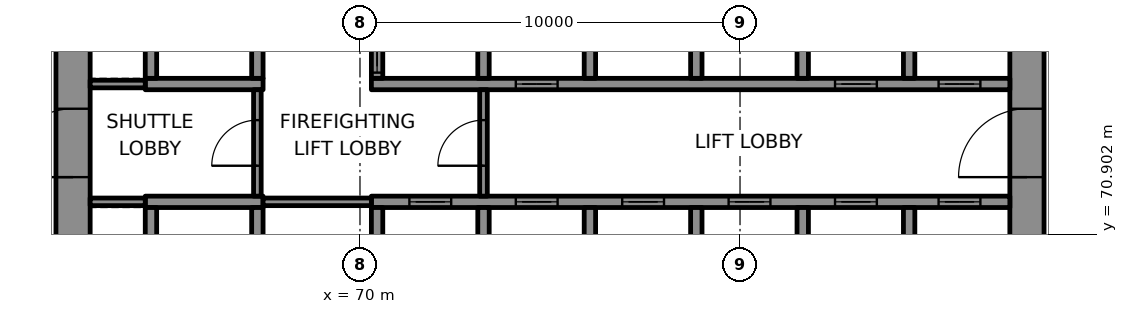
"""IFC4 building model, lengths in metres.
Left out: names, types, materials, properties, quantities, classifications, styles, units other than length and angle.
Written with IfcOpenShell. Run it as: python <this file> out.ifc"""

import sys

from ifc_helpers import new_model, si_unit, direction, frame, frame_2d, origin, place, context, subcontext, project, spatial, rectangle, extrude, element, fill, save


model = new_model("IFC4")
c1 = context("Model", 3, precision=1e-05, world=origin(), true_north=direction((0.0, 1.0)))
c2 = subcontext(c1, "Body", "Model", "MODEL_VIEW")
j1 = project(units=[si_unit("LENGTHUNIT", "METRE"), si_unit("PLANEANGLEUNIT", "RADIAN")], contexts=[c1])
p1 = place(None, origin())
s1 = spatial("IfcSite", under=j1, at=p1, CompositionType="ELEMENT")
p2 = place(p1, origin())
s2 = spatial("IfcBuilding", under=s1, at=p2, CompositionType="ELEMENT")
p3 = place(p2, frame((0.0, 0.0, 17.2)))
s3 = spatial("IfcBuildingStorey", under=s2, at=p3, CompositionType="ELEMENT", Elevation=17.2)
p4 = place(p3, frame((62.45, 66.9, 0.0), z_axis=(0.0, 0.0, 1.0), x_axis=(0.0, 1.0, 0.0)))
e1 = element("IfcWall", 1, at=p4, inside=s3, PredefinedType="SHEAR", context=c2, shape_type="SweptSolid", body=[
    extrude(rectangle(XDim=16.2, YDim=0.9, at=frame_2d((8.1, 0.0))), origin(), (0.0, 0.0, 1.0), 4.3),
])
p5 = place(p4, frame((5.5, 0.0, 0.0)))
e2 = element("IfcOpeningElement", 2, at=p5, cuts=e1, PredefinedType="OPENING", context=c2, shape_type="SweptSolid", body=[
    extrude(rectangle(XDim=1.8, YDim=2.1, at=frame_2d((0.9, 1.05))), frame((0.0, 0.46, 0.0), z_axis=(0.0, -1.0, 0.0), x_axis=(1.0, 0.0, 0.0)), (0.0, 0.0, 1.0), 0.92),
])
p6 = place(p3, frame((87.55, 66.9, 0.0), z_axis=(0.0, 0.0, 1.0), x_axis=(0.0, 1.0, 0.0)))
e3 = element("IfcWall", 3, at=p6, inside=s3, PredefinedType="SHEAR", context=c2, shape_type="SweptSolid", body=[
    extrude(rectangle(XDim=16.2, YDim=0.9, at=frame_2d((8.1, 0.0))), origin(), (0.0, 0.0, 1.0), 4.3),
])
p7 = place(p6, frame((5.5, 0.0, 0.0)))
e4 = element("IfcOpeningElement", 4, at=p7, cuts=e3, PredefinedType="OPENING", context=c2, shape_type="SweptSolid", body=[
    extrude(rectangle(XDim=1.8, YDim=2.1, at=frame_2d((0.9, 1.05))), frame((0.0, 0.46, 0.0), z_axis=(0.0, -1.0, 0.0), x_axis=(1.0, 0.0, 0.0)), (0.0, 0.0, 1.0), 0.92),
])
p8 = place(p6, frame((12.272, 0.0, 0.0)))
e5 = element("IfcOpeningElement", 5, at=p8, cuts=e3, PredefinedType="OPENING", context=c2, shape_type="SweptSolid", body=[
    extrude(rectangle(XDim=0.9, YDim=2.1, at=frame_2d((0.45, 1.05))), frame((0.0, 0.46, 0.0), z_axis=(0.0, -1.0, 0.0), x_axis=(1.0, 0.0, 0.0)), (0.0, 0.0, 1.0), 0.92),
])
p9 = place(p3, frame((64.35, 71.75, 0.0), z_axis=(0.0, 0.0, 1.0), x_axis=(1.0, 0.0, 0.0)))
e6 = element("IfcWall", 6, at=p9, inside=s3, PredefinedType="SHEAR", context=c2, shape_type="SweptSolid", body=[
    extrude(rectangle(XDim=3.1, YDim=0.3, at=frame_2d((1.55, 0.0))), origin(), (0.0, 0.0, 1.0), 4.3),
])
p10 = place(p3, frame((70.3, 71.75, 0.0), z_axis=(0.0, 0.0, 1.0), x_axis=(1.0, 0.0, 0.0)))
e7 = element("IfcWall", 7, at=p10, inside=s3, PredefinedType="SHEAR", context=c2, shape_type="SweptSolid", body=[
    extrude(rectangle(XDim=16.8, YDim=0.3, at=frame_2d((8.4, 0.0))), origin(), (0.0, 0.0, 1.0), 4.3),
])
p11 = place(p10, frame((1.0, 0.0, 0.0)))
e8 = element("IfcOpeningElement", 8, at=p11, cuts=e7, PredefinedType="OPENING", context=c2, shape_type="SweptSolid", body=[
    extrude(rectangle(XDim=1.1, YDim=2.1, at=frame_2d((0.55, 1.05))), frame((0.0, 0.16, 0.0), z_axis=(0.0, -1.0, 0.0), x_axis=(1.0, 0.0, 0.0)), (0.0, 0.0, 1.0), 0.32),
])
p12 = place(p10, frame((3.8, 0.0, 0.0)))
e9 = element("IfcOpeningElement", 9, at=p12, cuts=e7, PredefinedType="OPENING", context=c2, shape_type="SweptSolid", body=[
    extrude(rectangle(XDim=1.1, YDim=2.1, at=frame_2d((0.55, 1.05))), frame((0.0, 0.16, 0.0), z_axis=(0.0, -1.0, 0.0), x_axis=(1.0, 0.0, 0.0)), (0.0, 0.0, 1.0), 0.32),
])
p13 = place(p10, frame((6.6, 0.0, 0.0)))
e10 = element("IfcOpeningElement", 10, at=p13, cuts=e7, PredefinedType="OPENING", context=c2, shape_type="SweptSolid", body=[
    extrude(rectangle(XDim=1.1, YDim=2.1, at=frame_2d((0.55, 1.05))), frame((0.0, 0.16, 0.0), z_axis=(0.0, -1.0, 0.0), x_axis=(1.0, 0.0, 0.0)), (0.0, 0.0, 1.0), 0.32),
])
p14 = place(p10, frame((9.4, 0.0, 0.0)))
e11 = element("IfcOpeningElement", 11, at=p14, cuts=e7, PredefinedType="OPENING", context=c2, shape_type="SweptSolid", body=[
    extrude(rectangle(XDim=1.1, YDim=2.1, at=frame_2d((0.55, 1.05))), frame((0.0, 0.16, 0.0), z_axis=(0.0, -1.0, 0.0), x_axis=(1.0, 0.0, 0.0)), (0.0, 0.0, 1.0), 0.32),
])
p15 = place(p10, frame((12.2, 0.0, 0.0)))
e12 = element("IfcOpeningElement", 12, at=p15, cuts=e7, PredefinedType="OPENING", context=c2, shape_type="SweptSolid", body=[
    extrude(rectangle(XDim=1.1, YDim=2.1, at=frame_2d((0.55, 1.05))), frame((0.0, 0.16, 0.0), z_axis=(0.0, -1.0, 0.0), x_axis=(1.0, 0.0, 0.0)), (0.0, 0.0, 1.0), 0.32),
])
p16 = place(p10, frame((14.925, 0.0, 0.0)))
e13 = element("IfcOpeningElement", 13, at=p16, cuts=e7, PredefinedType="OPENING", context=c2, shape_type="SweptSolid", body=[
    extrude(rectangle(XDim=1.1, YDim=2.1, at=frame_2d((0.55, 1.05))), frame((0.0, 0.16, 0.0), z_axis=(0.0, -1.0, 0.0), x_axis=(1.0, 0.0, 0.0)), (0.0, 0.0, 1.0), 0.32),
])
p17 = place(p3, frame((64.35, 74.85, 0.0), z_axis=(0.0, 0.0, 1.0), x_axis=(1.0, 0.0, 0.0)))
e14 = element("IfcWall", 14, at=p17, inside=s3, PredefinedType="SHEAR", context=c2, shape_type="SweptSolid", body=[
    extrude(rectangle(XDim=3.1, YDim=0.3, at=frame_2d((1.55, 0.0))), origin(), (0.0, 0.0, 1.0), 4.3),
])
p18 = place(p3, frame((70.3, 74.85, 0.0), z_axis=(0.0, 0.0, 1.0), x_axis=(1.0, 0.0, 0.0)))
e15 = element("IfcWall", 15, at=p18, inside=s3, PredefinedType="SHEAR", context=c2, shape_type="SweptSolid", body=[
    extrude(rectangle(XDim=16.8, YDim=0.3, at=frame_2d((8.4, 0.0))), origin(), (0.0, 0.0, 1.0), 4.3),
])
p19 = place(p18, frame((3.8, 0.0, 0.0)))
e16 = element("IfcOpeningElement", 16, at=p19, cuts=e15, PredefinedType="OPENING", context=c2, shape_type="SweptSolid", body=[
    extrude(rectangle(XDim=1.1, YDim=2.1, at=frame_2d((0.55, 1.05))), frame((0.0, 0.16, 0.0), z_axis=(0.0, -1.0, 0.0), x_axis=(1.0, 0.0, 0.0)), (0.0, 0.0, 1.0), 0.32),
])
p20 = place(p18, frame((12.2, 0.0, 0.0)))
e17 = element("IfcOpeningElement", 17, at=p20, cuts=e15, PredefinedType="OPENING", context=c2, shape_type="SweptSolid", body=[
    extrude(rectangle(XDim=1.1, YDim=2.1, at=frame_2d((0.55, 1.05))), frame((0.0, 0.16, 0.0), z_axis=(0.0, -1.0, 0.0), x_axis=(1.0, 0.0, 0.0)), (0.0, 0.0, 1.0), 0.32),
])
p21 = place(p18, frame((14.925, 0.0, 0.0)))
e18 = element("IfcOpeningElement", 18, at=p21, cuts=e15, PredefinedType="OPENING", context=c2, shape_type="SweptSolid", body=[
    extrude(rectangle(XDim=1.1, YDim=2.1, at=frame_2d((0.55, 1.05))), frame((0.0, 0.16, 0.0), z_axis=(0.0, -1.0, 0.0), x_axis=(1.0, 0.0, 0.0)), (0.0, 0.0, 1.0), 0.32),
])
for number, where, z_axis, x_axis in (
    (19, (64.5, 69.0, 0.0), (0.0, 0.0, 1.0), (0.0, 1.0, 0.0)),
    (20, (64.5, 75.0, 0.0), (0.0, 0.0, 1.0), (0.0, 1.0, 0.0)),
    (21, (67.3, 69.0, 0.0), (0.0, 0.0, 1.0), (0.0, 1.0, 0.0)),
    (22, (67.3, 75.0, 0.0), (0.0, 0.0, 1.0), (0.0, 1.0, 0.0)),
    (23, (70.45, 69.0, 0.0), (0.0, 0.0, 1.0), (0.0, 1.0, 0.0)),
):
    element("IfcWall", number, at=place(p3, frame(where, z_axis=z_axis, x_axis=x_axis)), inside=s3, PredefinedType="SHEAR", context=c2, shape_type="SweptSolid", body=[
        extrude(rectangle(XDim=2.6, YDim=0.3, at=frame_2d((1.3, 0.0))), origin(), (0.0, 0.0, 1.0), 4.3),
    ])
p22 = place(p3, frame((70.45, 75.0, 0.0), z_axis=(0.0, 0.0, 1.0), x_axis=(0.0, 1.0, 0.0)))
e24 = element("IfcWall", 24, at=p22, inside=s3, PredefinedType="SHEAR", context=c2, shape_type="SweptSolid", body=[
    extrude(rectangle(XDim=2.6, YDim=0.3, at=frame_2d((1.3, 0.0))), origin(), (0.0, 0.0, 1.0), 4.3),
])
p23 = place(p22, frame((0.15, 0.0, 0.0)))
e25 = element("IfcOpeningElement", 25, at=p23, cuts=e24, PredefinedType="OPENING", context=c2, shape_type="SweptSolid", body=[
    extrude(rectangle(XDim=1.1, YDim=2.1, at=frame_2d((0.55, 1.05))), frame((0.0, 0.16, 0.0), z_axis=(0.0, -1.0, 0.0), x_axis=(1.0, 0.0, 0.0)), (0.0, 0.0, 1.0), 0.32),
])
for number, where, z_axis, x_axis in (
    (26, (73.25, 69.0, 0.0), (0.0, 0.0, 1.0), (0.0, 1.0, 0.0)),
    (27, (73.25, 75.0, 0.0), (0.0, 0.0, 1.0), (0.0, 1.0, 0.0)),
    (28, (76.05, 69.0, 0.0), (0.0, 0.0, 1.0), (0.0, 1.0, 0.0)),
    (29, (76.05, 75.0, 0.0), (0.0, 0.0, 1.0), (0.0, 1.0, 0.0)),
    (30, (78.85, 69.0, 0.0), (0.0, 0.0, 1.0), (0.0, 1.0, 0.0)),
    (31, (78.85, 75.0, 0.0), (0.0, 0.0, 1.0), (0.0, 1.0, 0.0)),
    (32, (81.65, 69.0, 0.0), (0.0, 0.0, 1.0), (0.0, 1.0, 0.0)),
    (33, (81.65, 75.0, 0.0), (0.0, 0.0, 1.0), (0.0, 1.0, 0.0)),
    (34, (84.45, 69.0, 0.0), (0.0, 0.0, 1.0), (0.0, 1.0, 0.0)),
    (35, (84.45, 75.0, 0.0), (0.0, 0.0, 1.0), (0.0, 1.0, 0.0)),
):
    element("IfcWall", number, at=place(p3, frame(where, z_axis=z_axis, x_axis=x_axis)), inside=s3, PredefinedType="SHEAR", context=c2, shape_type="SweptSolid", body=[
        extrude(rectangle(XDim=2.6, YDim=0.3, at=frame_2d((1.3, 0.0))), origin(), (0.0, 0.0, 1.0), 4.3),
    ])
p24 = place(p3, frame((62.9, 71.75, 0.0), z_axis=(0.0, 0.0, 1.0), x_axis=(1.0, 0.0, 0.0)))
e36 = element("IfcWall", 36, at=p24, inside=s3, PredefinedType="PARTITIONING", context=c2, shape_type="SweptSolid", body=[
    extrude(rectangle(XDim=1.45, YDim=0.2, at=frame_2d((0.725, 0.0))), origin(), (0.0, 0.0, 1.0), 4.3),
])
p25 = place(p3, frame((67.45, 71.75, 0.0), z_axis=(0.0, 0.0, 1.0), x_axis=(1.0, 0.0, 0.0)))
e37 = element("IfcWall", 37, at=p25, inside=s3, PredefinedType="PARTITIONING", context=c2, shape_type="SweptSolid", body=[
    extrude(rectangle(XDim=2.85, YDim=0.2, at=frame_2d((1.425, 0.0))), origin(), (0.0, 0.0, 1.0), 4.3),
])
p26 = place(p3, frame((62.9, 74.85, 0.0), z_axis=(0.0, 0.0, 1.0), x_axis=(1.0, 0.0, 0.0)))
e38 = element("IfcWall", 38, at=p26, inside=s3, PredefinedType="PARTITIONING", context=c2, shape_type="SweptSolid", body=[
    extrude(rectangle(XDim=1.45, YDim=0.2, at=frame_2d((0.725, 0.0))), origin(), (0.0, 0.0, 1.0), 4.3),
])
p27 = place(p3, frame((67.3, 71.9, 0.0), z_axis=(0.0, 0.0, 1.0), x_axis=(0.0, 1.0, 0.0)))
e39 = element("IfcWall", 39, at=p27, inside=s3, PredefinedType="PARTITIONING", context=c2, shape_type="SweptSolid", body=[
    extrude(rectangle(XDim=2.8, YDim=0.2, at=frame_2d((1.4, 0.0))), origin(), (0.0, 0.0, 1.0), 4.3),
])
p28 = place(p27, frame((0.8, 0.0, 0.0)))
e40 = element("IfcOpeningElement", 40, at=p28, cuts=e39, PredefinedType="OPENING", context=c2, shape_type="SweptSolid", body=[
    extrude(rectangle(XDim=1.2, YDim=2.1, at=frame_2d((0.6, 1.05))), frame((0.0, 0.11, 0.0), z_axis=(0.0, -1.0, 0.0), x_axis=(1.0, 0.0, 0.0)), (0.0, 0.0, 1.0), 0.22),
])
p29 = place(p3, frame((73.25, 71.9, 0.0), z_axis=(0.0, 0.0, 1.0), x_axis=(0.0, 1.0, 0.0)))
e41 = element("IfcWall", 41, at=p29, inside=s3, PredefinedType="PARTITIONING", context=c2, shape_type="SweptSolid", body=[
    extrude(rectangle(XDim=2.8, YDim=0.2, at=frame_2d((1.4, 0.0))), origin(), (0.0, 0.0, 1.0), 4.3),
])
p30 = place(p29, frame((0.8, 0.0, 0.0)))
e42 = element("IfcOpeningElement", 42, at=p30, cuts=e41, PredefinedType="OPENING", context=c2, shape_type="SweptSolid", body=[
    extrude(rectangle(XDim=1.2, YDim=2.1, at=frame_2d((0.6, 1.05))), frame((0.0, 0.11, 0.0), z_axis=(0.0, -1.0, 0.0), x_axis=(1.0, 0.0, 0.0)), (0.0, 0.0, 1.0), 0.22),
])
p31 = place(p3, frame((107.106, 62.36, 0.0), z_axis=(0.0, 0.0, 1.0), x_axis=(-0.49999992739, 0.866025445706, 0.0)))
e43 = element("IfcWall", 43, at=p31, inside=s3, PredefinedType="SOLIDWALL", context=c2, shape_type="SweptSolid", body=[
    extrude(rectangle(XDim=54.0, YDim=0.4, at=frame_2d((27.0, 0.0))), origin(), (0.0, 0.0, 1.0), 4.24),
])
p32 = place(p3, frame((112.496, 65.725, 0.0), z_axis=(0.0, 0.0, 1.0), x_axis=(-0.499998673217, 0.866026169802, 0.0)))
e44 = element("IfcWall", 44, at=p32, inside=s3, PredefinedType="PARTITIONING", context=c2, shape_type="SweptSolid", body=[
    extrude(rectangle(XDim=53.48, YDim=0.2, at=frame_2d((26.74, 0.0))), origin(), (0.0, 0.0, 1.0), 4.24),
])
p33 = place(p32, frame((13.08, 0.0, 0.0)))
e45 = element("IfcOpeningElement", 45, at=p33, cuts=e44, PredefinedType="OPENING", context=c2, shape_type="SweptSolid", body=[
    extrude(rectangle(XDim=1.0, YDim=2.1, at=frame_2d((0.5, 1.05))), frame((0.0, 0.11, 0.0), z_axis=(0.0, -1.0, 0.0), x_axis=(1.0, 0.0, 0.0)), (0.0, 0.0, 1.0), 0.22),
])
p34 = place(p32, frame((26.28, 0.0, 0.0)))
e46 = element("IfcOpeningElement", 46, at=p34, cuts=e44, PredefinedType="OPENING", context=c2, shape_type="SweptSolid", body=[
    extrude(rectangle(XDim=1.0, YDim=2.1, at=frame_2d((0.5, 1.05))), frame((0.0, 0.11, 0.0), z_axis=(0.0, -1.0, 0.0), x_axis=(1.0, 0.0, 0.0)), (0.0, 0.0, 1.0), 0.22),
])
p35 = place(p32, frame((43.88, 0.0, 0.0)))
e47 = element("IfcOpeningElement", 47, at=p35, cuts=e44, PredefinedType="OPENING", context=c2, shape_type="SweptSolid", body=[
    extrude(rectangle(XDim=1.0, YDim=2.1, at=frame_2d((0.5, 1.05))), frame((0.0, 0.11, 0.0), z_axis=(0.0, -1.0, 0.0), x_axis=(1.0, 0.0, 0.0)), (0.0, 0.0, 1.0), 0.22),
])
p36 = place(p32, frame((50.58, 0.0, 0.0)))
e48 = element("IfcOpeningElement", 48, at=p36, cuts=e44, PredefinedType="OPENING", context=c2, shape_type="SweptSolid", body=[
    extrude(rectangle(XDim=1.0, YDim=2.1, at=frame_2d((0.5, 1.05))), frame((0.0, 0.11, 0.0), z_axis=(0.0, -1.0, 0.0), x_axis=(1.0, 0.0, 0.0)), (0.0, 0.0, 1.0), 0.22),
])
p37 = place(p11, origin())
e49 = element("IfcDoor", 49, at=p37, inside=s3, OperationType="DOUBLE_DOOR_SLIDING", PredefinedType="DOOR", context=c2, shape_type="SweptSolid", body=[
    extrude(rectangle(XDim=1.1, YDim=2.1, at=frame_2d((0.55, 1.05))), frame((0.0, 0.025, 0.0), z_axis=(0.0, -1.0, 0.0), x_axis=(1.0, 0.0, 0.0)), (0.0, 0.0, 1.0), 0.05),
])
fill(e8, e49)
p38 = place(p12, origin())
e50 = element("IfcDoor", 50, at=p38, inside=s3, OperationType="DOUBLE_DOOR_SLIDING", PredefinedType="DOOR", context=c2, shape_type="SweptSolid", body=[
    extrude(rectangle(XDim=1.1, YDim=2.1, at=frame_2d((0.55, 1.05))), frame((0.0, 0.025, 0.0), z_axis=(0.0, -1.0, 0.0), x_axis=(1.0, 0.0, 0.0)), (0.0, 0.0, 1.0), 0.05),
])
fill(e9, e50)
p39 = place(p13, origin())
e51 = element("IfcDoor", 51, at=p39, inside=s3, OperationType="DOUBLE_DOOR_SLIDING", PredefinedType="DOOR", context=c2, shape_type="SweptSolid", body=[
    extrude(rectangle(XDim=1.1, YDim=2.1, at=frame_2d((0.55, 1.05))), frame((0.0, 0.025, 0.0), z_axis=(0.0, -1.0, 0.0), x_axis=(1.0, 0.0, 0.0)), (0.0, 0.0, 1.0), 0.05),
])
fill(e10, e51)
p40 = place(p14, origin())
e52 = element("IfcDoor", 52, at=p40, inside=s3, OperationType="DOUBLE_DOOR_SLIDING", PredefinedType="DOOR", context=c2, shape_type="SweptSolid", body=[
    extrude(rectangle(XDim=1.1, YDim=2.1, at=frame_2d((0.55, 1.05))), frame((0.0, 0.025, 0.0), z_axis=(0.0, -1.0, 0.0), x_axis=(1.0, 0.0, 0.0)), (0.0, 0.0, 1.0), 0.05),
])
fill(e11, e52)
p41 = place(p15, origin())
e53 = element("IfcDoor", 53, at=p41, inside=s3, OperationType="DOUBLE_DOOR_SLIDING", PredefinedType="DOOR", context=c2, shape_type="SweptSolid", body=[
    extrude(rectangle(XDim=1.1, YDim=2.1, at=frame_2d((0.55, 1.05))), frame((0.0, 0.025, 0.0), z_axis=(0.0, -1.0, 0.0), x_axis=(1.0, 0.0, 0.0)), (0.0, 0.0, 1.0), 0.05),
])
fill(e12, e53)
p42 = place(p16, origin())
e54 = element("IfcDoor", 54, at=p42, inside=s3, OperationType="DOUBLE_DOOR_SLIDING", PredefinedType="DOOR", context=c2, shape_type="SweptSolid", body=[
    extrude(rectangle(XDim=1.1, YDim=2.1, at=frame_2d((0.55, 1.05))), frame((0.0, 0.025, 0.0), z_axis=(0.0, -1.0, 0.0), x_axis=(1.0, 0.0, 0.0)), (0.0, 0.0, 1.0), 0.05),
])
fill(e13, e54)
p43 = place(p23, origin())
e55 = element("IfcDoor", 55, at=p43, inside=s3, OperationType="DOUBLE_DOOR_SLIDING", PredefinedType="DOOR", context=c2, shape_type="SweptSolid", body=[
    extrude(rectangle(XDim=1.1, YDim=2.1, at=frame_2d((0.55, 1.05))), frame((0.0, 0.025, 0.0), z_axis=(0.0, -1.0, 0.0), x_axis=(1.0, 0.0, 0.0)), (0.0, 0.0, 1.0), 0.05),
])
fill(e25, e55)
p44 = place(p19, origin())
e56 = element("IfcDoor", 56, at=p44, inside=s3, OperationType="DOUBLE_DOOR_SLIDING", PredefinedType="DOOR", context=c2, shape_type="SweptSolid", body=[
    extrude(rectangle(XDim=1.1, YDim=2.1, at=frame_2d((0.55, 1.05))), frame((0.0, 0.025, 0.0), z_axis=(0.0, -1.0, 0.0), x_axis=(1.0, 0.0, 0.0)), (0.0, 0.0, 1.0), 0.05),
])
fill(e16, e56)
p45 = place(p20, origin())
e57 = element("IfcDoor", 57, at=p45, inside=s3, OperationType="DOUBLE_DOOR_SLIDING", PredefinedType="DOOR", context=c2, shape_type="SweptSolid", body=[
    extrude(rectangle(XDim=1.1, YDim=2.1, at=frame_2d((0.55, 1.05))), frame((0.0, 0.025, 0.0), z_axis=(0.0, -1.0, 0.0), x_axis=(1.0, 0.0, 0.0)), (0.0, 0.0, 1.0), 0.05),
])
fill(e17, e57)
p46 = place(p21, origin())
e58 = element("IfcDoor", 58, at=p46, inside=s3, OperationType="DOUBLE_DOOR_SLIDING", PredefinedType="DOOR", context=c2, shape_type="SweptSolid", body=[
    extrude(rectangle(XDim=1.1, YDim=2.1, at=frame_2d((0.55, 1.05))), frame((0.0, 0.025, 0.0), z_axis=(0.0, -1.0, 0.0), x_axis=(1.0, 0.0, 0.0)), (0.0, 0.0, 1.0), 0.05),
])
fill(e18, e58)
p47 = place(p30, origin())
e59 = element("IfcDoor", 59, at=p47, inside=s3, OperationType="SINGLE_SWING_LEFT", PredefinedType="DOOR", context=c2, shape_type="SweptSolid", body=[
    extrude(rectangle(XDim=1.2, YDim=2.1, at=frame_2d((0.6, 1.05))), frame((0.0, 0.025, 0.0), z_axis=(0.0, -1.0, 0.0), x_axis=(1.0, 0.0, 0.0)), (0.0, 0.0, 1.0), 0.05),
])
fill(e42, e59)
p48 = place(p28, origin())
e60 = element("IfcDoor", 60, at=p48, inside=s3, OperationType="SINGLE_SWING_RIGHT", PredefinedType="DOOR", context=c2, shape_type="SweptSolid", body=[
    extrude(rectangle(XDim=1.2, YDim=2.1, at=frame_2d((0.6, 1.05))), frame((0.0, 0.025, 0.0), z_axis=(0.0, -1.0, 0.0), x_axis=(1.0, 0.0, 0.0)), (0.0, 0.0, 1.0), 0.05),
])
fill(e40, e60)
p49 = place(p5, origin())
e61 = element("IfcDoor", 61, at=p49, inside=s3, OperationType="SINGLE_SWING_LEFT", PredefinedType="DOOR", context=c2, shape_type="SweptSolid", body=[
    extrude(rectangle(XDim=1.8, YDim=2.1, at=frame_2d((0.9, 1.05))), frame((0.0, 0.17, 0.0), z_axis=(0.0, -1.0, 0.0), x_axis=(1.0, 0.0, 0.0)), (0.0, 0.0, 1.0), 0.34),
])
fill(e2, e61)
p50 = place(p7, origin())
e62 = element("IfcDoor", 62, at=p50, inside=s3, OperationType="SINGLE_SWING_RIGHT", PredefinedType="DOOR", context=c2, shape_type="SweptSolid", body=[
    extrude(rectangle(XDim=1.8, YDim=2.1, at=frame_2d((0.9, 1.05))), frame((0.0, 0.17, 0.0), z_axis=(0.0, -1.0, 0.0), x_axis=(1.0, 0.0, 0.0)), (0.0, 0.0, 1.0), 0.34),
])
fill(e4, e62)
save(model, sys.argv[1])
